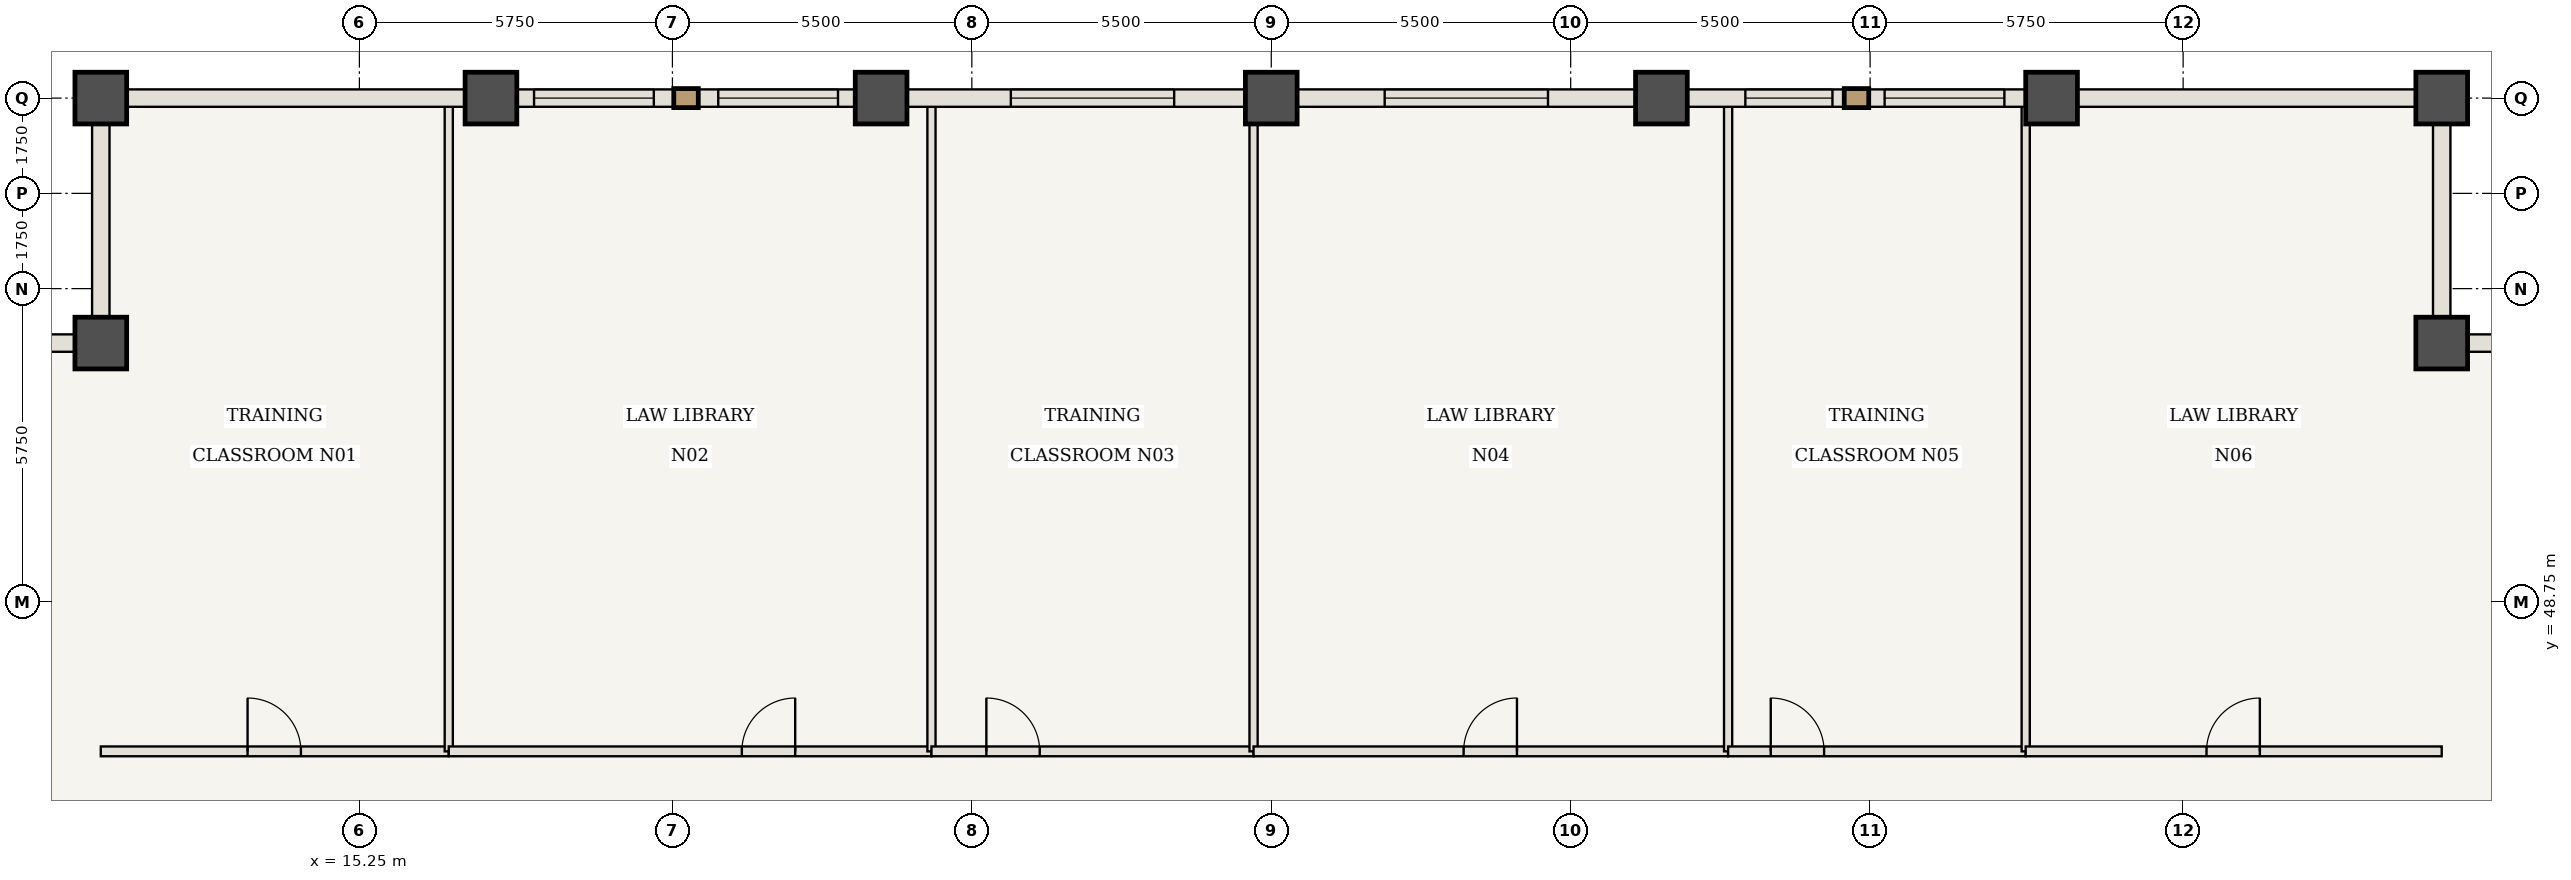
"""IFC4 building model, lengths in metres.
Left out: names, types, materials, properties, quantities, classifications, styles, units other than length and angle.
Written with IfcOpenShell. Run it as: python <this file> out.ifc"""

import sys

from ifc_helpers import new_model, si_unit, direction, frame, frame_2d, origin, origin_2d, place, context, subcontext, project, spatial, rectangle, extrude, element, fill, save


model = new_model("IFC4")
c1 = context("Model", 3, precision=1e-05, world=origin(), true_north=direction((0.0, 1.0)))
c2 = subcontext(c1, "Body", "Model", "MODEL_VIEW")
j1 = project(units=[si_unit("LENGTHUNIT", "METRE"), si_unit("PLANEANGLEUNIT", "RADIAN")], contexts=[c1])
p1 = place(None, origin())
s1 = spatial("IfcSite", under=j1, at=p1, CompositionType="ELEMENT")
p2 = place(p1, origin())
s2 = spatial("IfcBuilding", under=s1, at=p2, CompositionType="ELEMENT")
p3 = place(p2, frame((0.0, 0.0, 126.0)))
s3 = spatial("IfcBuildingStorey", under=s2, at=p3, CompositionType="ELEMENT", Elevation=126.0)
for number, where, z_axis, x_axis in (
    (1, (53.5, 53.5, 0.0), (0.0, 0.0, 1.0), (1.0, 0.0, 0.0)),
    (2, (53.5, 58.0, 0.0), (0.0, 0.0, 1.0), (1.0, 0.0, 0.0)),
    (3, (10.5, 58.0, 0.0), (0.0, 0.0, 1.0), (1.0, 0.0, 0.0)),
    (4, (10.5, 53.5, 0.0), (0.0, 0.0, 1.0), (1.0, 0.0, 0.0)),
    (5, (17.667, 58.0, 0.0), (0.0, 0.0, 1.0), (1.0, 0.0, 0.0)),
    (6, (24.833, 58.0, 0.0), (0.0, 0.0, 1.0), (1.0, 0.0, 0.0)),
    (7, (32.0, 58.0, 0.0), (0.0, 0.0, 1.0), (1.0, 0.0, 0.0)),
    (8, (39.167, 58.0, 0.0), (0.0, 0.0, 1.0), (1.0, 0.0, 0.0)),
    (9, (46.333, 58.0, 0.0), (0.0, 0.0, 1.0), (1.0, 0.0, 0.0)),
):
    element("IfcColumn", number, at=place(p3, frame(where, z_axis=z_axis, x_axis=x_axis)), inside=s3, PredefinedType="COLUMN", context=c2, shape_type="SweptSolid", body=[
        extrude(rectangle(XDim=0.95, YDim=0.95, at=origin_2d()), origin(), (0.0, 0.0, 1.0), 3.85),
    ])
p4 = place(p3, frame((10.5, 46.0, 0.0), z_axis=(0.0, 0.0, 1.0), x_axis=(1.0, 0.0, 0.0)))
e10 = element("IfcWall", 10, at=p4, inside=s3, PredefinedType="STANDARD", context=c2, shape_type="SweptSolid", body=[
    extrude(rectangle(XDim=6.392, YDim=0.18, at=frame_2d((3.196, 0.0))), origin(), (0.0, 0.0, 1.0), 3.685),
])
p5 = place(p4, frame((2.696, 0.0, 0.0)))
e11 = element("IfcOpeningElement", 11, at=p5, cuts=e10, PredefinedType="OPENING", context=c2, shape_type="SweptSolid", body=[
    extrude(rectangle(XDim=0.98, YDim=2.2, at=frame_2d((0.49, 1.1))), frame((0.0, 0.1, 0.0), z_axis=(0.0, -1.0, 0.0), x_axis=(1.0, 0.0, 0.0)), (0.0, 0.0, 1.0), 0.2),
])
p6 = place(p3, frame((16.892, 46.0, 0.0), z_axis=(0.0, 0.0, 1.0), x_axis=(0.0, 1.0, 0.0)))
e12 = element("IfcWall", 12, at=p6, inside=s3, PredefinedType="STANDARD", context=c2, shape_type="SweptSolid", body=[
    extrude(rectangle(XDim=11.94, YDim=0.15, at=frame_2d((5.97, 0.0))), origin(), (0.0, 0.0, 1.0), 3.685),
])
p7 = place(p3, frame((16.892, 46.0, 0.0), z_axis=(0.0, 0.0, 1.0), x_axis=(1.0, 0.0, 0.0)))
e13 = element("IfcWall", 13, at=p7, inside=s3, PredefinedType="STANDARD", context=c2, shape_type="SweptSolid", body=[
    extrude(rectangle(XDim=8.867, YDim=0.18, at=frame_2d((4.433, 0.0))), origin(), (0.0, 0.0, 1.0), 3.685),
])
p8 = place(p7, frame((5.383, 0.0, 0.0)))
e14 = element("IfcOpeningElement", 14, at=p8, cuts=e13, PredefinedType="OPENING", context=c2, shape_type="SweptSolid", body=[
    extrude(rectangle(XDim=0.98, YDim=2.2, at=frame_2d((0.49, 1.1))), frame((0.0, 0.1, 0.0), z_axis=(0.0, -1.0, 0.0), x_axis=(1.0, 0.0, 0.0)), (0.0, 0.0, 1.0), 0.2),
])
p9 = place(p3, frame((25.758, 46.0, 0.0), z_axis=(0.0, 0.0, 1.0), x_axis=(0.0, 1.0, 0.0)))
e15 = element("IfcWall", 15, at=p9, inside=s3, PredefinedType="STANDARD", context=c2, shape_type="SweptSolid", body=[
    extrude(rectangle(XDim=11.94, YDim=0.15, at=frame_2d((5.97, 0.0))), origin(), (0.0, 0.0, 1.0), 3.685),
])
p10 = place(p3, frame((25.758, 46.0, 0.0), z_axis=(0.0, 0.0, 1.0), x_axis=(1.0, 0.0, 0.0)))
e16 = element("IfcWall", 16, at=p10, inside=s3, PredefinedType="STANDARD", context=c2, shape_type="SweptSolid", body=[
    extrude(rectangle(XDim=5.917, YDim=0.18, at=frame_2d((2.958, 0.0))), origin(), (0.0, 0.0, 1.0), 3.685),
])
p11 = place(p10, frame((1.008, 0.0, 0.0)))
e17 = element("IfcOpeningElement", 17, at=p11, cuts=e16, PredefinedType="OPENING", context=c2, shape_type="SweptSolid", body=[
    extrude(rectangle(XDim=0.98, YDim=2.2, at=frame_2d((0.49, 1.1))), frame((0.0, 0.1, 0.0), z_axis=(0.0, -1.0, 0.0), x_axis=(1.0, 0.0, 0.0)), (0.0, 0.0, 1.0), 0.2),
])
p12 = place(p3, frame((31.675, 46.0, 0.0), z_axis=(0.0, 0.0, 1.0), x_axis=(0.0, 1.0, 0.0)))
e18 = element("IfcWall", 18, at=p12, inside=s3, PredefinedType="STANDARD", context=c2, shape_type="SweptSolid", body=[
    extrude(rectangle(XDim=11.94, YDim=0.15, at=frame_2d((5.97, 0.0))), origin(), (0.0, 0.0, 1.0), 3.685),
])
p13 = place(p3, frame((31.675, 46.0, 0.0), z_axis=(0.0, 0.0, 1.0), x_axis=(1.0, 0.0, 0.0)))
e19 = element("IfcWall", 19, at=p13, inside=s3, PredefinedType="STANDARD", context=c2, shape_type="SweptSolid", body=[
    extrude(rectangle(XDim=8.717, YDim=0.18, at=frame_2d((4.358, 0.0))), origin(), (0.0, 0.0, 1.0), 3.685),
])
p14 = place(p13, frame((3.858, 0.0, 0.0)))
e20 = element("IfcOpeningElement", 20, at=p14, cuts=e19, PredefinedType="OPENING", context=c2, shape_type="SweptSolid", body=[
    extrude(rectangle(XDim=0.98, YDim=2.2, at=frame_2d((0.49, 1.1))), frame((0.0, 0.1, 0.0), z_axis=(0.0, -1.0, 0.0), x_axis=(1.0, 0.0, 0.0)), (0.0, 0.0, 1.0), 0.2),
])
p15 = place(p3, frame((40.392, 46.0, 0.0), z_axis=(0.0, 0.0, 1.0), x_axis=(0.0, 1.0, 0.0)))
e21 = element("IfcWall", 21, at=p15, inside=s3, PredefinedType="STANDARD", context=c2, shape_type="SweptSolid", body=[
    extrude(rectangle(XDim=11.94, YDim=0.15, at=frame_2d((5.97, 0.0))), origin(), (0.0, 0.0, 1.0), 3.685),
])
p16 = place(p3, frame((40.392, 46.0, 0.0), z_axis=(0.0, 0.0, 1.0), x_axis=(1.0, 0.0, 0.0)))
e22 = element("IfcWall", 22, at=p16, inside=s3, PredefinedType="STANDARD", context=c2, shape_type="SweptSolid", body=[
    extrude(rectangle(XDim=5.467, YDim=0.18, at=frame_2d((2.733, 0.0))), origin(), (0.0, 0.0, 1.0), 3.685),
])
p17 = place(p16, frame((0.783, 0.0, 0.0)))
e23 = element("IfcOpeningElement", 23, at=p17, cuts=e22, PredefinedType="OPENING", context=c2, shape_type="SweptSolid", body=[
    extrude(rectangle(XDim=0.98, YDim=2.2, at=frame_2d((0.49, 1.1))), frame((0.0, 0.1, 0.0), z_axis=(0.0, -1.0, 0.0), x_axis=(1.0, 0.0, 0.0)), (0.0, 0.0, 1.0), 0.2),
])
p18 = place(p3, frame((45.858, 46.0, 0.0), z_axis=(0.0, 0.0, 1.0), x_axis=(0.0, 1.0, 0.0)))
e24 = element("IfcWall", 24, at=p18, inside=s3, PredefinedType="STANDARD", context=c2, shape_type="SweptSolid", body=[
    extrude(rectangle(XDim=11.94, YDim=0.15, at=frame_2d((5.97, 0.0))), origin(), (0.0, 0.0, 1.0), 3.685),
])
p19 = place(p3, frame((45.858, 46.0, 0.0), z_axis=(0.0, 0.0, 1.0), x_axis=(1.0, 0.0, 0.0)))
e25 = element("IfcWall", 25, at=p19, inside=s3, PredefinedType="STANDARD", context=c2, shape_type="SweptSolid", body=[
    extrude(rectangle(XDim=7.642, YDim=0.18, at=frame_2d((3.821, 0.0))), origin(), (0.0, 0.0, 1.0), 3.685),
])
p20 = place(p19, frame((3.321, 0.0, 0.0)))
e26 = element("IfcOpeningElement", 26, at=p20, cuts=e25, PredefinedType="OPENING", context=c2, shape_type="SweptSolid", body=[
    extrude(rectangle(XDim=0.98, YDim=2.2, at=frame_2d((0.49, 1.1))), frame((0.0, 0.1, 0.0), z_axis=(0.0, -1.0, 0.0), x_axis=(1.0, 0.0, 0.0)), (0.0, 0.0, 1.0), 0.2),
])
p21 = place(p3, frame((10.5, 58.0, 0.0), z_axis=(0.0, 0.0, 1.0), x_axis=(1.0, 0.0, 0.0)))
e27 = element("IfcWall", 27, at=p21, inside=s3, PredefinedType="USERDEFINED", context=c2, shape_type="SweptSolid", body=[
    extrude(rectangle(XDim=7.167, YDim=0.32, at=frame_2d((3.583, 0.0))), origin(), (0.0, 0.0, 1.0), 2.885),
])
p22 = place(p3, frame((17.667, 58.0, 0.0), z_axis=(0.0, 0.0, 1.0), x_axis=(1.0, 0.0, 0.0)))
e28 = element("IfcWall", 28, at=p22, inside=s3, PredefinedType="USERDEFINED", context=c2, shape_type="SweptSolid", body=[
    extrude(rectangle(XDim=7.167, YDim=0.32, at=frame_2d((3.583, 0.0))), origin(), (0.0, 0.0, 1.0), 2.885),
])
p23 = place(p22, frame((0.792, 0.0, 0.85)))
e29 = element("IfcOpeningElement", 29, at=p23, cuts=e28, PredefinedType="OPENING", context=c2, shape_type="SweptSolid", body=[
    extrude(rectangle(XDim=2.2, YDim=1.835, at=frame_2d((1.1, 0.917))), frame((0.0, 0.17, 0.0), z_axis=(0.0, -1.0, 0.0), x_axis=(1.0, 0.0, 0.0)), (0.0, 0.0, 1.0), 0.34),
])
p24 = place(p22, frame((4.175, 0.0, 0.85)))
e30 = element("IfcOpeningElement", 30, at=p24, cuts=e28, PredefinedType="OPENING", context=c2, shape_type="SweptSolid", body=[
    extrude(rectangle(XDim=2.2, YDim=1.835, at=frame_2d((1.1, 0.917))), frame((0.0, 0.17, 0.0), z_axis=(0.0, -1.0, 0.0), x_axis=(1.0, 0.0, 0.0)), (0.0, 0.0, 1.0), 0.34),
])
p25 = place(p3, frame((24.833, 58.0, 0.0), z_axis=(0.0, 0.0, 1.0), x_axis=(1.0, 0.0, 0.0)))
e31 = element("IfcWall", 31, at=p25, inside=s3, PredefinedType="USERDEFINED", context=c2, shape_type="SweptSolid", body=[
    extrude(rectangle(XDim=7.167, YDim=0.32, at=frame_2d((3.583, 0.0))), origin(), (0.0, 0.0, 1.0), 2.885),
])
p26 = place(p25, frame((2.383, 0.0, 0.85)))
e32 = element("IfcOpeningElement", 32, at=p26, cuts=e31, PredefinedType="OPENING", context=c2, shape_type="SweptSolid", body=[
    extrude(rectangle(XDim=3.0, YDim=1.835, at=frame_2d((1.5, 0.917))), frame((0.0, 0.17, 0.0), z_axis=(0.0, -1.0, 0.0), x_axis=(1.0, 0.0, 0.0)), (0.0, 0.0, 1.0), 0.34),
])
p27 = place(p3, frame((32.0, 58.0, 0.0), z_axis=(0.0, 0.0, 1.0), x_axis=(1.0, 0.0, 0.0)))
e33 = element("IfcWall", 33, at=p27, inside=s3, PredefinedType="USERDEFINED", context=c2, shape_type="SweptSolid", body=[
    extrude(rectangle(XDim=7.167, YDim=0.32, at=frame_2d((3.583, 0.0))), origin(), (0.0, 0.0, 1.0), 2.885),
])
p28 = place(p27, frame((2.083, 0.0, 0.85)))
e34 = element("IfcOpeningElement", 34, at=p28, cuts=e33, PredefinedType="OPENING", context=c2, shape_type="SweptSolid", body=[
    extrude(rectangle(XDim=3.0, YDim=1.835, at=frame_2d((1.5, 0.917))), frame((0.0, 0.17, 0.0), z_axis=(0.0, -1.0, 0.0), x_axis=(1.0, 0.0, 0.0)), (0.0, 0.0, 1.0), 0.34),
])
p29 = place(p3, frame((39.167, 58.0, 0.0), z_axis=(0.0, 0.0, 1.0), x_axis=(1.0, 0.0, 0.0)))
e35 = element("IfcWall", 35, at=p29, inside=s3, PredefinedType="USERDEFINED", context=c2, shape_type="SweptSolid", body=[
    extrude(rectangle(XDim=7.167, YDim=0.32, at=frame_2d((3.583, 0.0))), origin(), (0.0, 0.0, 1.0), 2.885),
])
p30 = place(p29, frame((1.542, 0.0, 0.85)))
e36 = element("IfcOpeningElement", 36, at=p30, cuts=e35, PredefinedType="OPENING", context=c2, shape_type="SweptSolid", body=[
    extrude(rectangle(XDim=1.6, YDim=1.835, at=frame_2d((0.8, 0.917))), frame((0.0, 0.17, 0.0), z_axis=(0.0, -1.0, 0.0), x_axis=(1.0, 0.0, 0.0)), (0.0, 0.0, 1.0), 0.34),
])
p31 = place(p29, frame((4.1, 0.0, 0.85)))
e37 = element("IfcOpeningElement", 37, at=p31, cuts=e35, PredefinedType="OPENING", context=c2, shape_type="SweptSolid", body=[
    extrude(rectangle(XDim=2.2, YDim=1.835, at=frame_2d((1.1, 0.917))), frame((0.0, 0.17, 0.0), z_axis=(0.0, -1.0, 0.0), x_axis=(1.0, 0.0, 0.0)), (0.0, 0.0, 1.0), 0.34),
])
p32 = place(p3, frame((46.333, 58.0, 0.0), z_axis=(0.0, 0.0, 1.0), x_axis=(1.0, 0.0, 0.0)))
e38 = element("IfcWall", 38, at=p32, inside=s3, PredefinedType="USERDEFINED", context=c2, shape_type="SweptSolid", body=[
    extrude(rectangle(XDim=7.167, YDim=0.32, at=frame_2d((3.583, 0.0))), origin(), (0.0, 0.0, 1.0), 2.885),
])
for number, where, z_axis, x_axis in (
    (39, (53.5, 53.5, 0.0), (0.0, 0.0, 1.0), (1.0, 0.0, 0.0)),
    (40, (53.5, 58.0, 0.0), (0.0, 0.0, 1.0), (0.0, -1.0, 0.0)),
    (41, (10.5, 53.5, 0.0), (0.0, 0.0, 1.0), (0.0, 1.0, 0.0)),
    (42, (6.0, 53.5, 0.0), (0.0, 0.0, 1.0), (1.0, 0.0, 0.0)),
):
    element("IfcWall", number, at=place(p3, frame(where, z_axis=z_axis, x_axis=x_axis)), inside=s3, PredefinedType="USERDEFINED", context=c2, shape_type="SweptSolid", body=[
        extrude(rectangle(XDim=4.5, YDim=0.32, at=frame_2d((2.25, 0.0))), origin(), (0.0, 0.0, 1.0), 2.885),
    ])
p33 = place(p5, origin())
e43 = element("IfcDoor", 43, at=p33, inside=s3, OperationType="SINGLE_SWING_LEFT", PredefinedType="DOOR", context=c2, shape_type="SweptSolid", body=[
    extrude(rectangle(XDim=0.98, YDim=2.2, at=frame_2d((0.49, 1.1))), frame((0.0, 0.025, 0.0), z_axis=(0.0, -1.0, 0.0), x_axis=(1.0, 0.0, 0.0)), (0.0, 0.0, 1.0), 0.05),
])
fill(e11, e43)
p34 = place(p8, origin())
e44 = element("IfcDoor", 44, at=p34, inside=s3, OperationType="SINGLE_SWING_RIGHT", PredefinedType="DOOR", context=c2, shape_type="SweptSolid", body=[
    extrude(rectangle(XDim=0.98, YDim=2.2, at=frame_2d((0.49, 1.1))), frame((0.0, 0.025, 0.0), z_axis=(0.0, -1.0, 0.0), x_axis=(1.0, 0.0, 0.0)), (0.0, 0.0, 1.0), 0.05),
])
fill(e14, e44)
p35 = place(p11, origin())
e45 = element("IfcDoor", 45, at=p35, inside=s3, OperationType="SINGLE_SWING_LEFT", PredefinedType="DOOR", context=c2, shape_type="SweptSolid", body=[
    extrude(rectangle(XDim=0.98, YDim=2.2, at=frame_2d((0.49, 1.1))), frame((0.0, 0.025, 0.0), z_axis=(0.0, -1.0, 0.0), x_axis=(1.0, 0.0, 0.0)), (0.0, 0.0, 1.0), 0.05),
])
fill(e17, e45)
p36 = place(p14, origin())
e46 = element("IfcDoor", 46, at=p36, inside=s3, OperationType="SINGLE_SWING_RIGHT", PredefinedType="DOOR", context=c2, shape_type="SweptSolid", body=[
    extrude(rectangle(XDim=0.98, YDim=2.2, at=frame_2d((0.49, 1.1))), frame((0.0, 0.025, 0.0), z_axis=(0.0, -1.0, 0.0), x_axis=(1.0, 0.0, 0.0)), (0.0, 0.0, 1.0), 0.05),
])
fill(e20, e46)
p37 = place(p17, origin())
e47 = element("IfcDoor", 47, at=p37, inside=s3, OperationType="SINGLE_SWING_LEFT", PredefinedType="DOOR", context=c2, shape_type="SweptSolid", body=[
    extrude(rectangle(XDim=0.98, YDim=2.2, at=frame_2d((0.49, 1.1))), frame((0.0, 0.025, 0.0), z_axis=(0.0, -1.0, 0.0), x_axis=(1.0, 0.0, 0.0)), (0.0, 0.0, 1.0), 0.05),
])
fill(e23, e47)
p38 = place(p20, origin())
e48 = element("IfcDoor", 48, at=p38, inside=s3, OperationType="SINGLE_SWING_RIGHT", PredefinedType="DOOR", context=c2, shape_type="SweptSolid", body=[
    extrude(rectangle(XDim=0.98, YDim=2.2, at=frame_2d((0.49, 1.1))), frame((0.0, 0.025, 0.0), z_axis=(0.0, -1.0, 0.0), x_axis=(1.0, 0.0, 0.0)), (0.0, 0.0, 1.0), 0.05),
])
fill(e26, e48)
p39 = place(p23, origin())
e49 = element("IfcWindow", 49, at=p39, inside=s3, PartitioningType="SINGLE_PANEL", PredefinedType="WINDOW", context=c2, shape_type="SweptSolid", body=[
    extrude(rectangle(XDim=2.2, YDim=1.835, at=frame_2d((1.1, 0.917))), frame((0.0, 0.03, 0.0), z_axis=(0.0, -1.0, 0.0), x_axis=(1.0, 0.0, 0.0)), (0.0, 0.0, 1.0), 0.06),
])
fill(e29, e49)
p40 = place(p24, origin())
e50 = element("IfcWindow", 50, at=p40, inside=s3, PartitioningType="SINGLE_PANEL", PredefinedType="WINDOW", context=c2, shape_type="SweptSolid", body=[
    extrude(rectangle(XDim=2.2, YDim=1.835, at=frame_2d((1.1, 0.917))), frame((0.0, 0.03, 0.0), z_axis=(0.0, -1.0, 0.0), x_axis=(1.0, 0.0, 0.0)), (0.0, 0.0, 1.0), 0.06),
])
fill(e30, e50)
p41 = place(p26, origin())
e51 = element("IfcWindow", 51, at=p41, inside=s3, PartitioningType="SINGLE_PANEL", PredefinedType="WINDOW", context=c2, shape_type="SweptSolid", body=[
    extrude(rectangle(XDim=3.0, YDim=1.835, at=frame_2d((1.5, 0.917))), frame((0.0, 0.03, 0.0), z_axis=(0.0, -1.0, 0.0), x_axis=(1.0, 0.0, 0.0)), (0.0, 0.0, 1.0), 0.06),
])
fill(e32, e51)
p42 = place(p28, origin())
e52 = element("IfcWindow", 52, at=p42, inside=s3, PartitioningType="SINGLE_PANEL", PredefinedType="WINDOW", context=c2, shape_type="SweptSolid", body=[
    extrude(rectangle(XDim=3.0, YDim=1.835, at=frame_2d((1.5, 0.917))), frame((0.0, 0.03, 0.0), z_axis=(0.0, -1.0, 0.0), x_axis=(1.0, 0.0, 0.0)), (0.0, 0.0, 1.0), 0.06),
])
fill(e34, e52)
p43 = place(p30, origin())
e53 = element("IfcWindow", 53, at=p43, inside=s3, PartitioningType="SINGLE_PANEL", PredefinedType="WINDOW", context=c2, shape_type="SweptSolid", body=[
    extrude(rectangle(XDim=1.6, YDim=1.835, at=frame_2d((0.8, 0.917))), frame((0.0, 0.03, 0.0), z_axis=(0.0, -1.0, 0.0), x_axis=(1.0, 0.0, 0.0)), (0.0, 0.0, 1.0), 0.06),
])
fill(e36, e53)
p44 = place(p31, origin())
e54 = element("IfcWindow", 54, at=p44, inside=s3, PartitioningType="SINGLE_PANEL", PredefinedType="WINDOW", context=c2, shape_type="SweptSolid", body=[
    extrude(rectangle(XDim=2.2, YDim=1.835, at=frame_2d((1.1, 0.917))), frame((0.0, 0.03, 0.0), z_axis=(0.0, -1.0, 0.0), x_axis=(1.0, 0.0, 0.0)), (0.0, 0.0, 1.0), 0.06),
])
fill(e37, e54)
save(model, sys.argv[1])
